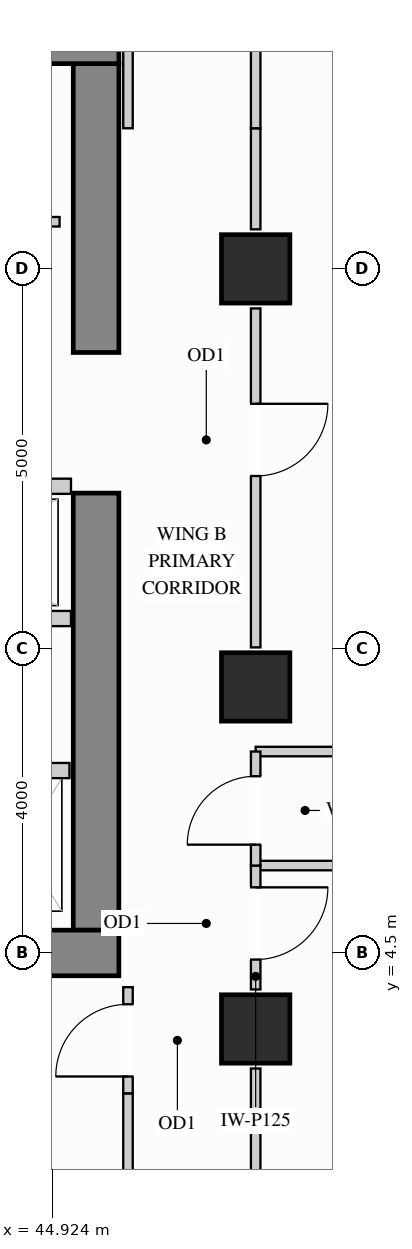
"""IFC4 building model, lengths in metres.
Left out: names, types, materials, properties, quantities, classifications, styles, units other than length and angle.
Written with IfcOpenShell. Run it as: python <this file> out.ifc"""

import sys

from ifc_helpers import new_model, si_unit, direction, frame, frame_2d, origin, origin_2d, place, context, subcontext, project, spatial, rectangle, extrude, source, transform, mapped, element, fill, save


model = new_model("IFC4")
c1 = context("Model", 3, precision=1e-05, world=origin(), true_north=direction((0.0, 1.0)))
c2 = subcontext(c1, "Body", "Model", "MODEL_VIEW")
j1 = project(units=[si_unit("LENGTHUNIT", "METRE"), si_unit("PLANEANGLEUNIT", "RADIAN")], contexts=[c1])
p1 = place(None, origin())
s1 = spatial("IfcSite", under=j1, at=p1, CompositionType="ELEMENT")
p2 = place(p1, origin())
s2 = spatial("IfcBuilding", under=s1, at=p2, CompositionType="ELEMENT")
p3 = place(p2, frame((0.0, 0.0, 182.7)))
s3 = spatial("IfcBuildingStorey", under=s2, at=p3, CompositionType="ELEMENT", Elevation=182.7)
m1 = source(origin(), c2, "Body", "SweptSolid", [
    extrude(rectangle(XDim=0.9, YDim=0.9, at=origin_2d()), origin(), (0.0, 0.0, 1.0), 3.4),
])
for number, where, z_axis, x_axis in (
    (1, (47.6, 13.5, 0.0), (0.0, 0.0, 1.0), (1.0, 0.0, 0.0)),
    (2, (47.6, 3.5, 0.0), (0.0, 0.0, 1.0), (1.0, 0.0, 0.0)),
    (3, (47.6, 8.0, 0.0), (0.0, 0.0, 1.0), (1.0, 0.0, 0.0)),
):
    element("IfcColumn", number, at=place(p3, frame(where, z_axis=z_axis, x_axis=x_axis)), inside=s3, PredefinedType="COLUMN", context=c2, shape_type="MappedRepresentation", body=[
        mapped(m1, transform((0.0, 0.0, 0.0), x_axis=(1.0, 0.0, 0.0), y_axis=(0.0, 1.0, 0.0), z_axis=(0.0, 0.0, 1.0))),
    ])
m2 = source(origin(), c2, "Body", "SweptSolid", [
    extrude(rectangle(XDim=5.75, YDim=0.6, at=frame_2d((2.875, 0.0))), origin(), (0.0, 0.0, 1.0), 3.4),
])
p4 = place(p3, frame((45.5, 4.8, 0.0), z_axis=(0.0, 0.0, 1.0), x_axis=(0.0, 1.0, 0.0)))
e4 = element("IfcWall", 4, at=p4, inside=s3, PredefinedType="SHEAR", context=c2, shape_type="MappedRepresentation", body=[
    mapped(m2, transform((0.0, 0.0, 0.0), x_axis=(1.0, 0.0, 0.0), y_axis=(0.0, 1.0, 0.0), z_axis=(0.0, 0.0, 1.0))),
])
m3 = source(origin(), c2, "Body", "SweptSolid", [
    extrude(rectangle(XDim=3.8, YDim=0.6, at=frame_2d((1.9, 0.0))), origin(), (0.0, 0.0, 1.0), 3.4),
])
p5 = place(p3, frame((45.5, 12.4, 0.0), z_axis=(0.0, 0.0, 1.0), x_axis=(0.0, 1.0, 0.0)))
e5 = element("IfcWall", 5, at=p5, inside=s3, PredefinedType="SHEAR", context=c2, shape_type="MappedRepresentation", body=[
    mapped(m3, transform((0.0, 0.0, 0.0), x_axis=(1.0, 0.0, 0.0), y_axis=(0.0, 1.0, 0.0), z_axis=(0.0, 0.0, 1.0))),
])
m4 = source(origin(), c2, "Body", "SweptSolid", [
    extrude(rectangle(XDim=10.1, YDim=0.6, at=frame_2d((5.05, 0.0))), origin(), (0.0, 0.0, 1.0), 3.4),
])
for number, where, z_axis, x_axis in (
    (6, (35.7, 16.5, 0.0), (0.0, 0.0, 1.0), (1.0, 0.0, 0.0)),
    (7, (35.7, 4.5, 0.0), (0.0, 0.0, 1.0), (1.0, 0.0, 0.0)),
):
    element("IfcWall", number, at=place(p3, frame(where, z_axis=z_axis, x_axis=x_axis)), inside=s3, PredefinedType="SHEAR", context=c2, shape_type="MappedRepresentation", body=[
        mapped(m4, transform((0.0, 0.0, 0.0), x_axis=(1.0, 0.0, 0.0), y_axis=(0.0, 1.0, 0.0), z_axis=(0.0, 0.0, 1.0))),
    ])
p6 = place(p3, frame((40.75, 14.12, 0.0), z_axis=(0.0, 0.0, 1.0), x_axis=(1.0, 0.0, 0.0)))
e8 = element("IfcWall", 8, at=p6, inside=s3, PredefinedType="PARTITIONING", context=c2, shape_type="SweptSolid", body=[
    extrude(rectangle(XDim=4.27, YDim=0.125, at=frame_2d((2.135, 0.0))), origin(), (0.0, 0.0, 1.0), 3.385),
])
p7 = place(p6, frame((1.66, 0.0, 0.0)))
e9 = element("IfcOpeningElement", 9, at=p7, cuts=e8, PredefinedType="OPENING", context=c2, shape_type="SweptSolid", body=[
    extrude(rectangle(XDim=0.95, YDim=2.15, at=frame_2d((0.475, 1.075))), frame((0.0, 0.073, 0.0), z_axis=(0.0, -1.0, 0.0), x_axis=(1.0, 0.0, 0.0)), (0.0, 0.0, 1.0), 0.145),
])
m5 = source(origin(), c2, "Body", "SweptSolid", [
    extrude(rectangle(XDim=5.048, YDim=0.125, at=frame_2d((2.524, 0.0))), origin(), (0.0, 0.0, 1.0), 3.385),
])
for number, where, z_axis, x_axis in (
    (10, (47.6, 5.65, 0.0), (0.0, 0.0, 1.0), (1.0, 0.0, 0.0)),
    (11, (47.6, 7.15, 0.0), (0.0, 0.0, 1.0), (1.0, 0.0, 0.0)),
):
    element("IfcWall", number, at=place(p3, frame(where, z_axis=z_axis, x_axis=x_axis)), inside=s3, PredefinedType="PARTITIONING", context=c2, shape_type="MappedRepresentation", body=[
        mapped(m5, transform((0.0, 0.0, 0.0), x_axis=(1.0, 0.0, 0.0), y_axis=(0.0, 1.0, 0.0), z_axis=(0.0, 0.0, 1.0))),
    ])
p8 = place(p3, frame((47.6, 4.02, 0.0), z_axis=(0.0, 0.0, 1.0), x_axis=(0.0, 1.0, 0.0)))
e12 = element("IfcWall", 12, at=p8, inside=s3, PredefinedType="PARTITIONING", context=c2, shape_type="SweptSolid", body=[
    extrude(rectangle(XDim=1.63, YDim=0.125, at=frame_2d((0.815, 0.0))), origin(), (0.0, 0.0, 1.0), 2.773),
])
p9 = place(p8, frame((0.393, 0.0, 0.0)))
e13 = element("IfcOpeningElement", 13, at=p9, cuts=e12, PredefinedType="OPENING", context=c2, shape_type="SweptSolid", body=[
    extrude(rectangle(XDim=0.95, YDim=2.15, at=frame_2d((0.475, 1.075))), frame((0.0, 0.073, 0.0), z_axis=(0.0, -1.0, 0.0), x_axis=(1.0, 0.0, 0.0)), (0.0, 0.0, 1.0), 0.145),
])
m6 = source(origin(), c2, "Body", "SweptSolid", [
    extrude(rectangle(XDim=1.86, YDim=0.125, at=frame_2d((0.93, 0.0))), origin(), (0.0, 0.0, 1.0), 2.773),
])
p10 = place(p3, frame((47.6, 1.12, 0.0), z_axis=(0.0, 0.0, 1.0), x_axis=(0.0, 1.0, 0.0)))
e14 = element("IfcWall", 14, at=p10, inside=s3, PredefinedType="PARTITIONING", context=c2, shape_type="MappedRepresentation", body=[
    mapped(m6, transform((0.0, 0.0, 0.0), x_axis=(1.0, 0.0, 0.0), y_axis=(0.0, 1.0, 0.0), z_axis=(0.0, 0.0, 1.0))),
])
p11 = place(p3, frame((47.6, 8.52, 0.0), z_axis=(0.0, 0.0, 1.0), x_axis=(0.0, 1.0, 0.0)))
e15 = element("IfcWall", 15, at=p11, inside=s3, PredefinedType="PARTITIONING", context=c2, shape_type="SweptSolid", body=[
    extrude(rectangle(XDim=4.46, YDim=0.125, at=frame_2d((2.23, 0.0))), origin(), (0.0, 0.0, 1.0), 2.773),
])
p12 = place(p11, frame((2.255, 0.0, 0.0)))
e16 = element("IfcOpeningElement", 16, at=p12, cuts=e15, PredefinedType="OPENING", context=c2, shape_type="SweptSolid", body=[
    extrude(rectangle(XDim=0.95, YDim=2.15, at=frame_2d((0.475, 1.075))), frame((0.0, 0.073, 0.0), z_axis=(0.0, -1.0, 0.0), x_axis=(1.0, 0.0, 0.0)), (0.0, 0.0, 1.0), 0.145),
])
m7 = source(origin(), c2, "Body", "SweptSolid", [
    extrude(rectangle(XDim=1.33, YDim=0.125, at=frame_2d((0.665, 0.0))), origin(), (0.0, 0.0, 1.0), 2.773),
])
p13 = place(p3, frame((47.6, 14.02, 0.0), z_axis=(0.0, 0.0, 1.0), x_axis=(0.0, 1.0, 0.0)))
e17 = element("IfcWall", 17, at=p13, inside=s3, PredefinedType="PARTITIONING", context=c2, shape_type="MappedRepresentation", body=[
    mapped(m7, transform((0.0, 0.0, 0.0), x_axis=(1.0, 0.0, 0.0), y_axis=(0.0, 1.0, 0.0), z_axis=(0.0, 0.0, 1.0))),
])
m8 = source(origin(), c2, "Body", "SweptSolid", [
    extrude(rectangle(XDim=1.53, YDim=0.125, at=frame_2d((0.765, 0.0))), origin(), (0.0, 0.0, 1.0), 2.773),
])
p14 = place(p3, frame((47.6, 15.35, 0.0), z_axis=(0.0, 0.0, 1.0), x_axis=(0.0, 1.0, 0.0)))
e18 = element("IfcWall", 18, at=p14, inside=s3, PredefinedType="PARTITIONING", context=c2, shape_type="MappedRepresentation", body=[
    mapped(m8, transform((0.0, 0.0, 0.0), x_axis=(1.0, 0.0, 0.0), y_axis=(0.0, 1.0, 0.0), z_axis=(0.0, 0.0, 1.0))),
])
p15 = place(p3, frame((47.6, 5.65, 0.0), z_axis=(0.0, 0.0, 1.0), x_axis=(0.0, 1.0, 0.0)))
e19 = element("IfcWall", 19, at=p15, inside=s3, PredefinedType="PARTITIONING", context=c2, shape_type="SweptSolid", body=[
    extrude(rectangle(XDim=1.5, YDim=0.125, at=frame_2d((0.75, 0.0))), origin(), (0.0, 0.0, 1.0), 2.773),
])
p16 = place(p15, frame((0.275, 0.0, 0.0)))
e20 = element("IfcOpeningElement", 20, at=p16, cuts=e19, PredefinedType="OPENING", context=c2, shape_type="SweptSolid", body=[
    extrude(rectangle(XDim=0.9, YDim=2.15, at=frame_2d((0.45, 1.075))), frame((0.0, 0.073, 0.0), z_axis=(0.0, -1.0, 0.0), x_axis=(1.0, 0.0, 0.0)), (0.0, 0.0, 1.0), 0.145),
])
m9 = source(origin(), c2, "Body", "SweptSolid", [
    extrude(rectangle(XDim=2.298, YDim=0.125, at=frame_2d((1.149, 0.0))), origin(), (0.0, 0.0, 1.0), 3.385),
])
p17 = place(p3, frame((45.92, 15.35, 0.0), z_axis=(0.0, 0.0, 1.0), x_axis=(0.0, 1.0, 0.0)))
e21 = element("IfcWall", 21, at=p17, inside=s3, PredefinedType="PARTITIONING", context=c2, shape_type="MappedRepresentation", body=[
    mapped(m9, transform((0.0, 0.0, 0.0), x_axis=(1.0, 0.0, 0.0), y_axis=(0.0, 1.0, 0.0), z_axis=(0.0, 0.0, 1.0))),
])
p18 = place(p3, frame((45.92, 2.65, 0.0), z_axis=(0.0, 0.0, 1.0), x_axis=(0.0, 1.0, 0.0)))
e22 = element("IfcWall", 22, at=p18, inside=s3, PredefinedType="PARTITIONING", context=c2, shape_type="SweptSolid", body=[
    extrude(rectangle(XDim=1.4, YDim=0.125, at=frame_2d((0.7, 0.0))), origin(), (0.0, 0.0, 1.0), 3.385),
])
p19 = place(p18, frame((0.225, 0.0, 0.0)))
e23 = element("IfcOpeningElement", 23, at=p19, cuts=e22, PredefinedType="OPENING", context=c2, shape_type="SweptSolid", body=[
    extrude(rectangle(XDim=0.95, YDim=2.15, at=frame_2d((0.475, 1.075))), frame((0.0, 0.073, 0.0), z_axis=(0.0, -1.0, 0.0), x_axis=(1.0, 0.0, 0.0)), (0.0, 0.0, 1.0), 0.145),
])
p20 = place(p3, frame((45.92, 0.352, 0.0), z_axis=(0.0, 0.0, 1.0), x_axis=(0.0, 1.0, 0.0)))
e24 = element("IfcWall", 24, at=p20, inside=s3, PredefinedType="PARTITIONING", context=c2, shape_type="MappedRepresentation", body=[
    mapped(m9, transform((0.0, 0.0, 0.0), x_axis=(1.0, 0.0, 0.0), y_axis=(0.0, 1.0, 0.0), z_axis=(0.0, 0.0, 1.0))),
])
m10 = source(origin(), c2, "Body", "SweptSolid", [
    extrude(rectangle(XDim=1.3, YDim=0.2, at=frame_2d((0.65, 0.0))), origin(), (0.0, 0.0, 1.0), 3.385),
])
p21 = place(p3, frame((43.85, 6.9, 0.0), z_axis=(0.0, 0.0, 1.0), x_axis=(1.0, 0.0, 0.0)))
e25 = element("IfcWall", 25, at=p21, inside=s3, PredefinedType="PARTITIONING", context=c2, shape_type="MappedRepresentation", body=[
    mapped(m10, transform((0.0, 0.0, 0.0), x_axis=(1.0, 0.0, 0.0), y_axis=(0.0, 1.0, 0.0), z_axis=(0.0, 0.0, 1.0))),
])
m11 = source(origin(), c2, "Body", "SweptSolid", [
    extrude(rectangle(XDim=3.49, YDim=0.2, at=frame_2d((1.745, 0.0))), origin(), (0.0, 0.0, 1.0), 3.385),
])
for number, where, z_axis, x_axis in (
    (26, (41.68, 10.64, 0.0), (0.0, 0.0, 1.0), (1.0, 0.0, 0.0)),
    (27, (41.68, 8.9, 0.0), (0.0, 0.0, 1.0), (1.0, 0.0, 0.0)),
):
    element("IfcWall", number, at=place(p3, frame(where, z_axis=z_axis, x_axis=x_axis)), inside=s3, PredefinedType="PARTITIONING", context=c2, shape_type="MappedRepresentation", body=[
        mapped(m11, transform((0.0, 0.0, 0.0), x_axis=(1.0, 0.0, 0.0), y_axis=(0.0, 1.0, 0.0), z_axis=(0.0, 0.0, 1.0))),
    ])
m12 = source(origin(), c2, "Body", "SweptSolid", [
    extrude(rectangle(XDim=0.95, YDim=2.15, at=frame_2d((0.475, 1.075))), frame((0.0, 0.025, 0.0), z_axis=(0.0, -1.0, 0.0), x_axis=(1.0, 0.0, 0.0)), (0.0, 0.0, 1.0), 0.05),
])
p22 = place(p19, origin())
e28 = element("IfcDoor", 28, at=p22, inside=s3, OperationType="SINGLE_SWING_LEFT", PredefinedType="DOOR", context=c2, shape_type="MappedRepresentation", body=[
    mapped(m12, transform((0.0, 0.0, 0.0), x_axis=(1.0, 0.0, 0.0), y_axis=(0.0, 1.0, 0.0), z_axis=(0.0, 0.0, 1.0))),
])
fill(e23, e28)
p23 = place(p9, origin())
e29 = element("IfcDoor", 29, at=p23, inside=s3, OperationType="SINGLE_SWING_RIGHT", PredefinedType="DOOR", context=c2, shape_type="MappedRepresentation", body=[
    mapped(m12, transform((0.0, 0.0, 0.0), x_axis=(1.0, 0.0, 0.0), y_axis=(0.0, 1.0, 0.0), z_axis=(0.0, 0.0, 1.0))),
])
fill(e13, e29)
p24 = place(p12, origin())
e30 = element("IfcDoor", 30, at=p24, inside=s3, OperationType="SINGLE_SWING_RIGHT", PredefinedType="DOOR", context=c2, shape_type="MappedRepresentation", body=[
    mapped(m12, transform((0.0, 0.0, 0.0), x_axis=(1.0, 0.0, 0.0), y_axis=(0.0, 1.0, 0.0), z_axis=(0.0, 0.0, 1.0))),
])
fill(e16, e30)
m13 = source(origin(), c2, "Body", "SweptSolid", [
    extrude(rectangle(XDim=0.9, YDim=2.15, at=frame_2d((0.45, 1.075))), frame((0.0, 0.025, 0.0), z_axis=(0.0, -1.0, 0.0), x_axis=(1.0, 0.0, 0.0)), (0.0, 0.0, 1.0), 0.05),
])
p25 = place(p16, origin())
e31 = element("IfcDoor", 31, at=p25, inside=s3, OperationType="SINGLE_SWING_LEFT", PredefinedType="DOOR", context=c2, shape_type="MappedRepresentation", body=[
    mapped(m13, transform((0.0, 0.0, 0.0), x_axis=(1.0, 0.0, 0.0), y_axis=(0.0, 1.0, 0.0), z_axis=(0.0, 0.0, 1.0))),
])
fill(e20, e31)
save(model, sys.argv[1])
